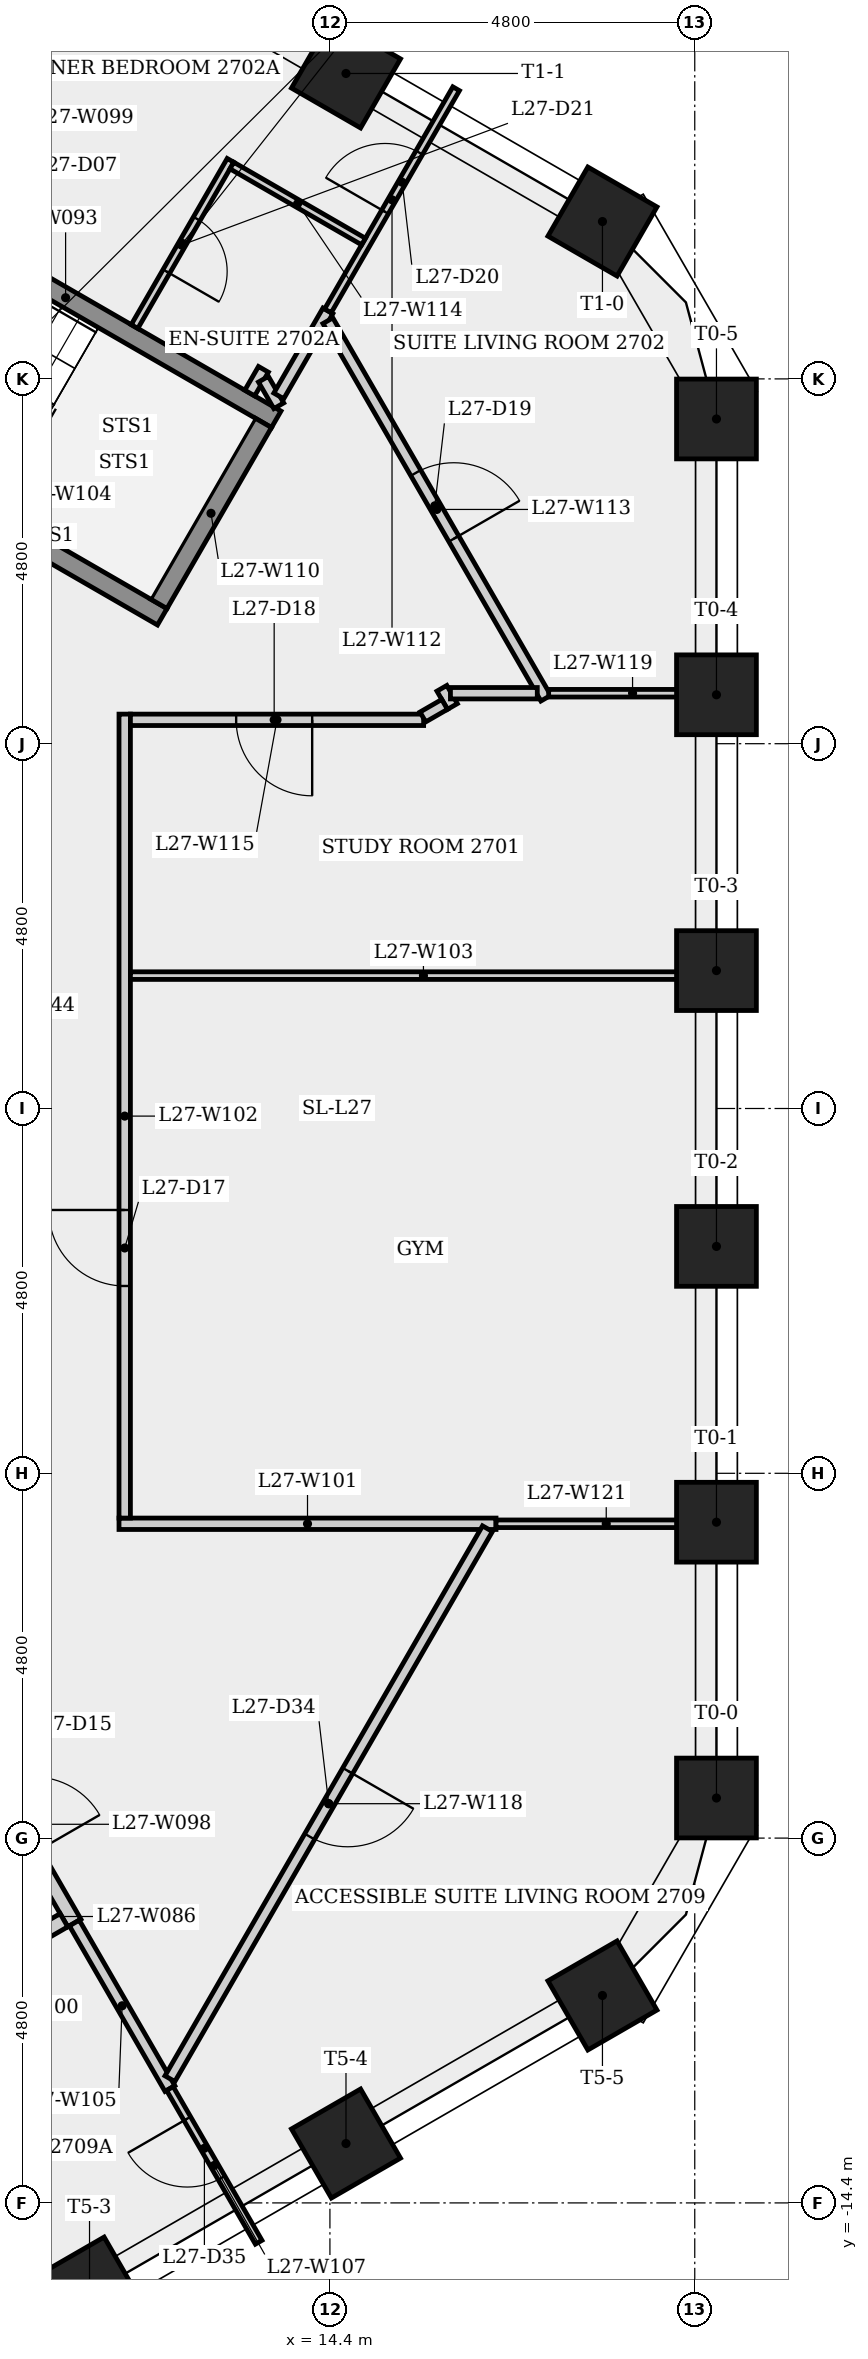
"""IFC4 building model, lengths in metres.
Left out: names, types, materials, properties, quantities, classifications, styles, units other than length and angle.
Written with IfcOpenShell. Run it as: python <this file> out.ifc"""

import sys

from ifc_helpers import new_model, si_unit, direction, frame, frame_2d, origin, origin_2d, place, context, subcontext, project, spatial, rectangle, extrude, element, fill, save


model = new_model("IFC4")
c1 = context("Model", 3, precision=1e-05, world=origin(), true_north=direction((0.0, 1.0)))
c2 = subcontext(c1, "Body", "Model", "MODEL_VIEW")
j1 = project(units=[si_unit("LENGTHUNIT", "METRE"), si_unit("PLANEANGLEUNIT", "RADIAN")], contexts=[c1])
p1 = place(None, origin())
s1 = spatial("IfcSite", under=j1, at=p1, CompositionType="ELEMENT")
p2 = place(p1, origin())
s2 = spatial("IfcBuilding", under=s1, at=p2, CompositionType="ELEMENT")
p3 = place(p2, frame((0.0, 0.0, 103.5)))
s3 = spatial("IfcBuildingStorey", under=s2, at=p3, CompositionType="ELEMENT", Elevation=103.5)
for number, where, z_axis, x_axis in (
    (1, (19.486, -9.073, 0.0), (0.0, 0.0, 1.0), (1.0, 0.0, 0.0)),
    (2, (19.486, -5.444, 0.0), (0.0, 0.0, 1.0), (1.0, 0.0, 0.0)),
    (3, (19.486, -1.814, 0.0), (0.0, 0.0, 1.0), (1.0, 0.0, 0.0)),
    (4, (19.486, 1.814, 0.0), (0.0, 0.0, 1.0), (1.0, 0.0, 0.0)),
    (5, (19.486, 5.444, 0.0), (0.0, 0.0, 1.0), (1.0, 0.0, 0.0)),
    (6, (19.486, 9.073, 0.0), (0.0, 0.0, 1.0), (1.0, 0.0, 0.0)),
    (7, (17.986, 11.671, 0.0), (0.0, 0.0, 1.0), (0.5, 0.866, 0.0)),
    (8, (14.611, 13.619, 0.0), (0.0, 0.0, 1.0), (0.5, 0.866, 0.0)),
    (9, (11.237, -15.567, 0.0), (0.0, 0.0, 1.0), (0.5, -0.866, 0.0)),
    (10, (14.611, -13.619, 0.0), (0.0, 0.0, 1.0), (0.5, -0.866, 0.0)),
    (11, (17.986, -11.671, 0.0), (0.0, 0.0, 1.0), (0.5, -0.866, 0.0)),
):
    element("IfcColumn", number, at=place(p3, frame(where, z_axis=z_axis, x_axis=x_axis)), inside=s3, PredefinedType="COLUMN", context=c2, shape_type="SweptSolid", body=[
        extrude(rectangle(XDim=1.05, YDim=1.05, at=origin_2d()), origin(), (0.0, 0.0, 1.0), 3.4),
    ])
p4 = place(p3, frame((8.151, 12.268, 0.0), z_axis=(0.0, 0.0, 1.0), x_axis=(0.866025499775, -0.499999833739, 0.0)))
e12 = element("IfcWall", 12, at=p4, inside=s3, PredefinedType="SHEAR", context=c2, shape_type="SweptSolid", body=[
    extrude(rectangle(XDim=6.4, YDim=0.25, at=frame_2d((3.2, 0.0))), origin(), (0.0, 0.0, 1.0), 3.05),
])
p5 = place(p3, frame((9.537, -8.119, 0.0), z_axis=(0.0, 0.0, 1.0), x_axis=(0.499990139034, -0.866031096941, 0.0)))
e13 = element("IfcWall", 13, at=p5, inside=s3, PredefinedType="PARTITIONING", context=c2, shape_type="SweptSolid", body=[
    extrude(rectangle(XDim=3.0, YDim=0.2, at=frame_2d((1.5, 0.0))), origin(), (0.0, 0.0, 1.0), 3.05),
])
p6 = place(p5, frame((0.935, 0.0, 0.0)))
e14 = element("IfcOpeningElement", 14, at=p6, cuts=e13, PredefinedType="OPENING", context=c2, shape_type="SweptSolid", body=[
    extrude(rectangle(XDim=1.0, YDim=2.1, at=frame_2d((0.5, 1.05))), frame((0.0, 0.11, 0.0), z_axis=(0.0, -1.0, 0.0), x_axis=(1.0, 0.0, 0.0)), (0.0, 0.0, 1.0), 0.22),
])
p7 = place(p3, frame((10.805, 14.315, 0.0), z_axis=(0.0, 0.0, 1.0), x_axis=(-0.500013701029, -0.866017493347, 0.0)))
e15 = element("IfcWall", 15, at=p7, inside=s3, PredefinedType="PLUMBINGWALL", context=c2, shape_type="SweptSolid", body=[
    extrude(rectangle(XDim=2.975, YDim=0.2, at=frame_2d((1.488, 0.0))), origin(), (0.0, 0.0, 1.0), 3.05),
])
p8 = place(p3, frame((10.901, -10.681, 0.0), z_axis=(0.0, 0.0, 1.0), x_axis=(-0.866007538022, -0.500030943131, 0.0)))
e16 = element("IfcWall", 16, at=p8, inside=s3, PredefinedType="PARTITIONING", context=c2, shape_type="SweptSolid", body=[
    extrude(rectangle(XDim=2.375, YDim=0.2, at=frame_2d((1.188, 0.0))), origin(), (0.0, 0.0, 1.0), 3.05),
])
p9 = place(p3, frame((11.625, -5.464, 0.0), z_axis=(0.0, 0.0, 1.0), x_axis=(1.0, 0.0, 0.0)))
e17 = element("IfcWall", 17, at=p9, inside=s3, PredefinedType="PARTITIONING", context=c2, shape_type="SweptSolid", body=[
    extrude(rectangle(XDim=4.96, YDim=0.15, at=frame_2d((2.48, 0.0))), origin(), (0.0, 0.0, 1.0), 3.05),
])
p10 = place(p3, frame((11.7, -5.389, 0.0), z_axis=(0.0, 0.0, 1.0), x_axis=(0.0, 1.0, 0.0)))
e18 = element("IfcWall", 18, at=p10, inside=s3, PredefinedType="PARTITIONING", context=c2, shape_type="SweptSolid", body=[
    extrude(rectangle(XDim=10.578, YDim=0.15, at=frame_2d((5.289, 0.0))), origin(), (0.0, 0.0, 1.0), 3.05),
])
p11 = place(p10, frame((3.054, 0.0, 0.0)))
e19 = element("IfcOpeningElement", 19, at=p11, cuts=e18, PredefinedType="OPENING", context=c2, shape_type="SweptSolid", body=[
    extrude(rectangle(XDim=1.0, YDim=2.1, at=frame_2d((0.5, 1.05))), frame((0.0, 0.085, 0.0), z_axis=(0.0, -1.0, 0.0), x_axis=(1.0, 0.0, 0.0)), (0.0, 0.0, 1.0), 0.17),
])
p12 = place(p3, frame((11.775, 1.749, 0.0), z_axis=(0.0, 0.0, 1.0), x_axis=(1.0, 0.0, 0.0)))
e20 = element("IfcWall", 20, at=p12, inside=s3, PredefinedType="PARTITIONING", context=c2, shape_type="SweptSolid", body=[
    extrude(rectangle(XDim=7.711, YDim=0.1, at=frame_2d((3.855, 0.0))), origin(), (0.0, 0.0, 1.0), 3.05),
])
p13 = place(p3, frame((12.194, 6.47, 0.0), z_axis=(0.0, 0.0, 1.0), x_axis=(-0.866025499775, 0.499999833739, 0.0)))
e21 = element("IfcWall", 21, at=p13, inside=s3, PredefinedType="SHEAR", context=c2, shape_type="SweptSolid", body=[
    extrude(rectangle(XDim=6.4, YDim=0.25, at=frame_2d((3.2, 0.0))), origin(), (0.0, 0.0, 1.0), 3.05),
])
p14 = place(p13, frame((5.25, 0.0, 0.0)))
e22 = element("IfcOpeningElement", 22, at=p14, cuts=e21, PredefinedType="OPENING", context=c2, shape_type="SweptSolid", body=[
    extrude(rectangle(XDim=1.0, YDim=2.1, at=frame_2d((0.5, 1.05))), frame((0.0, 0.135, 0.0), z_axis=(0.0, -1.0, 0.0), x_axis=(1.0, 0.0, 0.0)), (0.0, 0.0, 1.0), 0.27),
])
p15 = place(p3, frame((12.295, -12.895, 0.0), z_axis=(0.0, 0.0, 1.0), x_axis=(-0.499991329354, 0.866030409726, 0.0)))
e23 = element("IfcWall", 23, at=p15, inside=s3, PredefinedType="PARTITIONING", context=c2, shape_type="SweptSolid", body=[
    extrude(rectangle(XDim=2.515, YDim=0.15, at=frame_2d((1.258, 0.0))), origin(), (0.0, 0.0, 1.0), 3.05),
])
p16 = place(p3, frame((13.092, 12.476, 0.0), z_axis=(0.0, 0.0, 1.0), x_axis=(-0.500048846702, -0.865997200291, 0.0)))
e24 = element("IfcWall", 24, at=p16, inside=s3, PredefinedType="PARTITIONING", context=c2, shape_type="SweptSolid", body=[
    extrude(rectangle(XDim=2.525, YDim=0.1, at=frame_2d((1.263, 0.0))), origin(), (0.0, 0.0, 1.0), 3.05),
])
p17 = place(p16, frame((0.887, 0.0, 0.0)))
e25 = element("IfcOpeningElement", 25, at=p17, cuts=e24, PredefinedType="OPENING", context=c2, shape_type="SweptSolid", body=[
    extrude(rectangle(XDim=0.8, YDim=2.1, at=frame_2d((0.4, 1.05))), frame((0.0, 0.06, 0.0), z_axis=(0.0, -1.0, 0.0), x_axis=(1.0, 0.0, 0.0)), (0.0, 0.0, 1.0), 0.12),
])
p18 = place(p3, frame((13.463, -14.918, 0.0), z_axis=(0.0, 0.0, 1.0), x_axis=(-0.500018062171, 0.866014975334, 0.0)))
e26 = element("IfcWall", 26, at=p18, inside=s3, PredefinedType="PARTITIONING", context=c2, shape_type="SweptSolid", body=[
    extrude(rectangle(XDim=2.335, YDim=0.1, at=frame_2d((1.168, 0.0))), origin(), (0.0, 0.0, 1.0), 3.05),
])
p19 = place(p18, frame((0.978, 0.0, 0.0)))
e27 = element("IfcOpeningElement", 27, at=p19, cuts=e26, PredefinedType="OPENING", context=c2, shape_type="SweptSolid", body=[
    extrude(rectangle(XDim=0.9, YDim=2.1, at=frame_2d((0.45, 1.05))), frame((0.0, 0.06, 0.0), z_axis=(0.0, -1.0, 0.0), x_axis=(1.0, 0.0, 0.0)), (0.0, 0.0, 1.0), 0.12),
])
p20 = place(p3, frame((13.345, 9.414, 0.0), z_axis=(0.0, 0.0, 1.0), x_axis=(0.500074377092, 0.865982457891, 0.0)))
e28 = element("IfcWall", 28, at=p20, inside=s3, PredefinedType="PARTITIONING", context=c2, shape_type="SweptSolid", body=[
    extrude(rectangle(XDim=0.36, YDim=0.15, at=frame_2d((0.18, 0.0))), origin(), (0.0, 0.0, 1.0), 3.05),
])
p21 = place(p3, frame((13.525, 9.596, 0.0), z_axis=(0.0, 0.0, 1.0), x_axis=(0.500297731093, -0.865853440406, 0.0)))
e29 = element("IfcWall", 29, at=p21, inside=s3, PredefinedType="PARTITIONING", context=c2, shape_type="SweptSolid", body=[
    extrude(rectangle(XDim=0.404, YDim=0.15, at=frame_2d((0.202, 0.0))), origin(), (0.0, 0.0, 1.0), 3.05),
])
p22 = place(p3, frame((13.523, 9.022, 0.0), z_axis=(0.0, 0.0, 1.0), x_axis=(-0.500034990121, -0.866005201286, 0.0)))
e30 = element("IfcWall", 30, at=p22, inside=s3, PredefinedType="SHEAR", context=c2, shape_type="SweptSolid", body=[
    extrude(rectangle(XDim=2.75, YDim=0.25, at=frame_2d((1.375, 0.0))), origin(), (0.0, 0.0, 1.0), 3.05),
])
p23 = place(p3, frame((13.727, 9.376, 0.0), z_axis=(0.0, 0.0, 1.0), x_axis=(0.499978610854, 0.866037752461, 0.0)))
e31 = element("IfcWall", 31, at=p23, inside=s3, PredefinedType="PARTITIONING", context=c2, shape_type="SweptSolid", body=[
    extrude(rectangle(XDim=1.292, YDim=0.15, at=frame_2d((0.646, 0.0))), origin(), (0.0, 0.0, 1.0), 3.05),
])
p24 = place(p3, frame((14.373, 10.495, 0.0), z_axis=(0.0, 0.0, 1.0), x_axis=(0.500006363716, 0.86602172966, 0.0)))
e32 = element("IfcWall", 32, at=p24, inside=s3, PredefinedType="PARTITIONING", context=c2, shape_type="SweptSolid", body=[
    extrude(rectangle(XDim=3.375, YDim=0.1, at=frame_2d((1.687, 0.0))), origin(), (0.0, 0.0, 1.0), 3.05),
])
p25 = place(p24, frame((1.504, 0.0, 0.0)))
e33 = element("IfcOpeningElement", 33, at=p25, cuts=e32, PredefinedType="OPENING", context=c2, shape_type="SweptSolid", body=[
    extrude(rectangle(XDim=0.9, YDim=2.1, at=frame_2d((0.45, 1.05))), frame((0.0, 0.06, 0.0), z_axis=(0.0, -1.0, 0.0), x_axis=(1.0, 0.0, 0.0)), (0.0, 0.0, 1.0), 0.12),
])
p26 = place(p3, frame((14.373, 10.365, 0.0), z_axis=(0.0, 0.0, 1.0), x_axis=(0.499985338323, -0.866033868542, 0.0)))
e34 = element("IfcWall", 34, at=p26, inside=s3, PredefinedType="PARTITIONING", context=c2, shape_type="SweptSolid", body=[
    extrude(rectangle(XDim=5.735, YDim=0.15, at=frame_2d((2.867, 0.0))), origin(), (0.0, 0.0, 1.0), 3.05),
])
p27 = place(p26, frame((2.312, 0.0, 0.0)))
e35 = element("IfcOpeningElement", 35, at=p27, cuts=e34, PredefinedType="OPENING", context=c2, shape_type="SweptSolid", body=[
    extrude(rectangle(XDim=1.0, YDim=2.1, at=frame_2d((0.5, 1.05))), frame((0.0, 0.085, 0.0), z_axis=(0.0, -1.0, 0.0), x_axis=(1.0, 0.0, 0.0)), (0.0, 0.0, 1.0), 0.17),
])
p28 = place(p3, frame((14.842, 11.407, 0.0), z_axis=(0.0, 0.0, 1.0), x_axis=(-0.866010750942, 0.50002537861, 0.0)))
e36 = element("IfcWall", 36, at=p28, inside=s3, PredefinedType="PARTITIONING", context=c2, shape_type="SweptSolid", body=[
    extrude(rectangle(XDim=2.0, YDim=0.1, at=frame_2d((1.0, 0.0))), origin(), (0.0, 0.0, 1.0), 3.05),
])
p29 = place(p3, frame((15.633, 5.114, 0.0), z_axis=(0.0, 0.0, 1.0), x_axis=(-1.0, 0.0, 0.0)))
e37 = element("IfcWall", 37, at=p29, inside=s3, PredefinedType="PARTITIONING", context=c2, shape_type="SweptSolid", body=[
    extrude(rectangle(XDim=3.858, YDim=0.15, at=frame_2d((1.929, 0.0))), origin(), (0.0, 0.0, 1.0), 3.05),
])
p30 = place(p29, frame((1.466, 0.0, 0.0)))
e38 = element("IfcOpeningElement", 38, at=p30, cuts=e37, PredefinedType="OPENING", context=c2, shape_type="SweptSolid", body=[
    extrude(rectangle(XDim=1.0, YDim=2.1, at=frame_2d((0.5, 1.05))), frame((0.0, 0.085, 0.0), z_axis=(0.0, -1.0, 0.0), x_axis=(1.0, 0.0, 0.0)), (0.0, 0.0, 1.0), 0.17),
])
p31 = place(p3, frame((15.873, 5.529, 0.0), z_axis=(0.0, 0.0, 1.0), x_axis=(0.500027802648, -0.866009351323, 0.0)))
e39 = element("IfcWall", 39, at=p31, inside=s3, PredefinedType="PARTITIONING", context=c2, shape_type="SweptSolid", body=[
    extrude(rectangle(XDim=0.277, YDim=0.15, at=frame_2d((0.138, 0.0))), origin(), (0.0, 0.0, 1.0), 3.05),
])
p32 = place(p3, frame((15.909, 5.317, 0.0), z_axis=(0.0, 0.0, 1.0), x_axis=(-0.865914853484, -0.500191429871, 0.0)))
e40 = element("IfcWall", 40, at=p32, inside=s3, PredefinedType="PARTITIONING", context=c2, shape_type="SweptSolid", body=[
    extrude(rectangle(XDim=0.33, YDim=0.15, at=frame_2d((0.165, 0.0))), origin(), (0.0, 0.0, 1.0), 3.05),
])
p33 = place(p3, frame((16.473, -5.529, 0.0), z_axis=(0.0, 0.0, 1.0), x_axis=(-0.499985493453, -0.866033778982, 0.0)))
e41 = element("IfcWall", 41, at=p33, inside=s3, PredefinedType="PARTITIONING", context=c2, shape_type="SweptSolid", body=[
    extrude(rectangle(XDim=8.356, YDim=0.15, at=frame_2d((4.178, 0.0))), origin(), (0.0, 0.0, 1.0), 3.05),
])
p34 = place(p33, frame((3.678, 0.0, 0.0)))
e42 = element("IfcOpeningElement", 42, at=p34, cuts=e41, PredefinedType="OPENING", context=c2, shape_type="SweptSolid", body=[
    extrude(rectangle(XDim=1.0, YDim=2.1, at=frame_2d((0.5, 1.05))), frame((0.0, 0.085, 0.0), z_axis=(0.0, -1.0, 0.0), x_axis=(1.0, 0.0, 0.0)), (0.0, 0.0, 1.0), 0.17),
])
p35 = place(p3, frame((17.278, 5.464, 0.0), z_axis=(0.0, 0.0, 1.0), x_axis=(1.0, 0.0, 0.0)))
e43 = element("IfcWall", 43, at=p35, inside=s3, PredefinedType="PARTITIONING", context=c2, shape_type="SweptSolid", body=[
    extrude(rectangle(XDim=2.208, YDim=0.1, at=frame_2d((1.104, 0.0))), origin(), (0.0, 0.0, 1.0), 3.05),
])
p36 = place(p3, frame((17.128, 5.464, 0.0), z_axis=(0.0, 0.0, 1.0), x_axis=(-1.0, 0.0, 0.0)))
e44 = element("IfcWall", 44, at=p36, inside=s3, PredefinedType="PARTITIONING", context=c2, shape_type="SweptSolid", body=[
    extrude(rectangle(XDim=1.143, YDim=0.15, at=frame_2d((0.571, 0.0))), origin(), (0.0, 0.0, 1.0), 3.05),
])
p37 = place(p3, frame((19.486, -5.464, 0.0), z_axis=(0.0, 0.0, 1.0), x_axis=(-1.0, 0.0, 0.0)))
e45 = element("IfcWall", 45, at=p37, inside=s3, PredefinedType="PARTITIONING", context=c2, shape_type="SweptSolid", body=[
    extrude(rectangle(XDim=2.9, YDim=0.1, at=frame_2d((1.45, 0.0))), origin(), (0.0, 0.0, 1.0), 3.05),
])
p38 = place(p11, origin())
e46 = element("IfcDoor", 46, at=p38, inside=s3, OperationType="SINGLE_SWING_RIGHT", PredefinedType="DOOR", context=c2, shape_type="SweptSolid", body=[
    extrude(rectangle(XDim=1.0, YDim=2.1, at=frame_2d((0.5, 1.05))), frame((0.0, 0.025, 0.0), z_axis=(0.0, -1.0, 0.0), x_axis=(1.0, 0.0, 0.0)), (0.0, 0.0, 1.0), 0.05),
])
fill(e19, e46)
p39 = place(p30, origin())
e47 = element("IfcDoor", 47, at=p39, inside=s3, OperationType="SINGLE_SWING_LEFT", PredefinedType="DOOR", context=c2, shape_type="SweptSolid", body=[
    extrude(rectangle(XDim=1.0, YDim=2.1, at=frame_2d((0.5, 1.05))), frame((0.0, 0.025, 0.0), z_axis=(0.0, -1.0, 0.0), x_axis=(1.0, 0.0, 0.0)), (0.0, 0.0, 1.0), 0.05),
])
fill(e38, e47)
p40 = place(p27, origin())
e48 = element("IfcDoor", 48, at=p40, inside=s3, OperationType="SINGLE_SWING_RIGHT", PredefinedType="DOOR", context=c2, shape_type="SweptSolid", body=[
    extrude(rectangle(XDim=1.0, YDim=2.1, at=frame_2d((0.5, 1.05))), frame((0.0, 0.025, 0.0), z_axis=(0.0, -1.0, 0.0), x_axis=(1.0, 0.0, 0.0)), (0.0, 0.0, 1.0), 0.05),
])
fill(e35, e48)
p41 = place(p25, origin())
e49 = element("IfcDoor", 49, at=p41, inside=s3, OperationType="SINGLE_SWING_LEFT", PredefinedType="DOOR", context=c2, shape_type="SweptSolid", body=[
    extrude(rectangle(XDim=0.9, YDim=2.1, at=frame_2d((0.45, 1.05))), frame((0.0, 0.025, 0.0), z_axis=(0.0, -1.0, 0.0), x_axis=(1.0, 0.0, 0.0)), (0.0, 0.0, 1.0), 0.05),
])
fill(e33, e49)
p42 = place(p17, origin())
e50 = element("IfcDoor", 50, at=p42, inside=s3, OperationType="SINGLE_SWING_RIGHT", PredefinedType="DOOR", context=c2, shape_type="SweptSolid", body=[
    extrude(rectangle(XDim=0.8, YDim=2.1, at=frame_2d((0.4, 1.05))), frame((0.0, 0.025, 0.0), z_axis=(0.0, -1.0, 0.0), x_axis=(1.0, 0.0, 0.0)), (0.0, 0.0, 1.0), 0.05),
])
fill(e25, e50)
p43 = place(p34, origin())
e51 = element("IfcDoor", 51, at=p43, inside=s3, OperationType="SINGLE_SWING_LEFT", PredefinedType="DOOR", context=c2, shape_type="SweptSolid", body=[
    extrude(rectangle(XDim=1.0, YDim=2.1, at=frame_2d((0.5, 1.05))), frame((0.0, 0.025, 0.0), z_axis=(0.0, -1.0, 0.0), x_axis=(1.0, 0.0, 0.0)), (0.0, 0.0, 1.0), 0.05),
])
fill(e42, e51)
p44 = place(p19, origin())
e52 = element("IfcDoor", 52, at=p44, inside=s3, OperationType="SINGLE_SWING_RIGHT", PredefinedType="DOOR", context=c2, shape_type="SweptSolid", body=[
    extrude(rectangle(XDim=0.9, YDim=2.1, at=frame_2d((0.45, 1.05))), frame((0.0, 0.025, 0.0), z_axis=(0.0, -1.0, 0.0), x_axis=(1.0, 0.0, 0.0)), (0.0, 0.0, 1.0), 0.05),
])
fill(e27, e52)
save(model, sys.argv[1])
